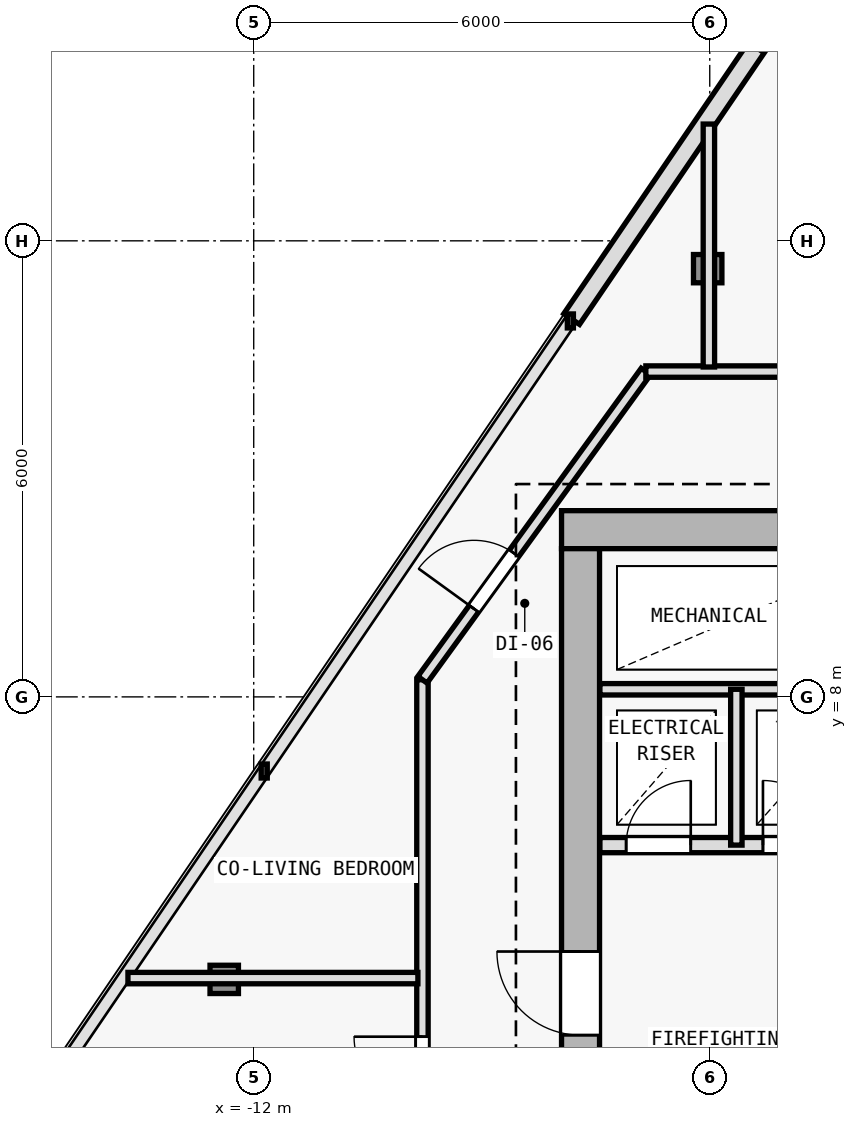
"""IFC4 building model, lengths in metres.
Left out: names, types, materials, properties, quantities, classifications, styles, units other than length and angle.
Written with IfcOpenShell. Run it as: python <this file> out.ifc"""

import sys

from ifc_helpers import new_model, si_unit, direction, frame, frame_2d, origin, origin_2d, place, context, subcontext, project, spatial, rectangle, i_section, extrude, element, fill, save


model = new_model("IFC4")
c1 = context("Model", 3, precision=1e-05, world=origin(), true_north=direction((0.0, 1.0)))
c2 = subcontext(c1, "Body", "Model", "MODEL_VIEW")
j1 = project(units=[si_unit("LENGTHUNIT", "METRE"), si_unit("PLANEANGLEUNIT", "RADIAN")], contexts=[c1])
p1 = place(None, origin())
s1 = spatial("IfcSite", under=j1, at=p1, CompositionType="ELEMENT")
p2 = place(p1, origin())
s2 = spatial("IfcBuilding", under=s1, at=p2, CompositionType="ELEMENT")
p3 = place(p2, frame((0.0, 0.0, 258.0)))
s3 = spatial("IfcBuildingStorey", under=s2, at=p3, CompositionType="ELEMENT", Elevation=258.0)
p4 = place(p3, frame((-7.7, 10.2, 0.0), z_axis=(0.0, 0.0, 1.0), x_axis=(1.0, 0.0, 0.0)))
e1 = element("IfcColumn", 1, at=p4, inside=s3, PredefinedType="COLUMN", context=c2, shape_type="SweptSolid", body=[
    extrude(i_section(OverallWidth=0.374, OverallDepth=0.372, WebThickness=0.012, FlangeThickness=0.02, FilletRadius=0.015, at=origin_2d()), origin(), (0.0, 0.0, 1.0), 3.6),
])
p5 = place(p3, frame((-6.027, 13.634, 0.006), z_axis=(0.00877514453, -0.002516901919, 0.999958330153), x_axis=(0.275705143097, 0.961242255662, 0.0)))
e2 = element("IfcColumn", 2, at=p5, inside=s3, PredefinedType="COLUMN", context=c2, shape_type="SweptSolid", body=[
    extrude(i_section(OverallWidth=0.374, OverallDepth=0.372, WebThickness=0.012, FlangeThickness=0.02, FilletRadius=0.015, at=origin_2d()), origin(), (0.0, 0.0, 1.0), 3.589),
])
p6 = place(p3, frame((-12.388, 4.283, 0.006), z_axis=(0.017003572908, 0.009522000828, 0.999810086971), x_axis=(-0.488603368932, 0.87250601595, 0.0)))
e3 = element("IfcColumn", 3, at=p6, inside=s3, PredefinedType="COLUMN", context=c2, shape_type="SweptSolid", body=[
    extrude(i_section(OverallWidth=0.374, OverallDepth=0.372, WebThickness=0.012, FlangeThickness=0.02, FilletRadius=0.015, at=origin_2d()), origin(), (0.0, 0.0, 1.0), 3.59),
])
p7 = place(p3, frame((-7.817, 12.971, 0.0), z_axis=(0.0, 0.0, 1.0), x_axis=(0.562474530687, 0.826814611826, 0.0)))
e4 = element("IfcWall", 4, at=p7, inside=s3, PredefinedType="SOLIDWALL", context=c2, shape_type="SweptSolid", body=[
    extrude(rectangle(XDim=10.107, YDim=0.25, at=frame_2d((5.053, 0.0))), origin(), (0.0, 0.0, 1.0), 3.35),
])
p8 = place(p7, frame((4.303, 0.0, 0.62)))
e5 = element("IfcOpeningElement", 5, at=p8, cuts=e4, PredefinedType="OPENING", context=c2, shape_type="SweptSolid", body=[
    extrude(rectangle(XDim=1.5, YDim=2.0, at=frame_2d((0.75, 1.0))), frame((0.0, 0.135, 0.0), z_axis=(0.0, -1.0, 0.0), x_axis=(1.0, 0.0, 0.0)), (0.0, 0.0, 1.0), 0.27),
])
p9 = place(p3, frame((7.95, 10.2, 0.0), z_axis=(0.0, 0.0, 1.0), x_axis=(-1.0, 0.0, 0.0)))
e6 = element("IfcWall", 6, at=p9, inside=s3, PredefinedType="SHEAR", context=c2, shape_type="SweptSolid", body=[
    extrude(rectangle(XDim=15.9, YDim=0.5, at=frame_2d((7.95, 0.0))), origin(), (0.0, 0.0, 1.0), 3.35),
])
p10 = place(p9, frame((4.4, 0.0, 0.0)))
e7 = element("IfcOpeningElement", 7, at=p10, cuts=e6, PredefinedType="OPENING", context=c2, shape_type="SweptSolid", body=[
    extrude(rectangle(XDim=1.1, YDim=2.15, at=frame_2d((0.55, 1.075))), frame((0.0, 0.26, 0.0), z_axis=(0.0, -1.0, 0.0), x_axis=(1.0, 0.0, 0.0)), (0.0, 0.0, 1.0), 0.52),
])
p11 = place(p3, frame((-7.7, -9.15, 0.0), z_axis=(0.0, 0.0, 1.0), x_axis=(0.0, 1.0, 0.0)))
e8 = element("IfcWall", 8, at=p11, inside=s3, PredefinedType="SHEAR", context=c2, shape_type="SweptSolid", body=[
    extrude(rectangle(XDim=19.1, YDim=0.5, at=frame_2d((9.55, 0.0))), origin(), (0.0, 0.0, 1.0), 3.35),
])
p12 = place(p11, frame((12.7, 0.0, 0.0)))
e9 = element("IfcOpeningElement", 9, at=p12, cuts=e8, PredefinedType="OPENING", context=c2, shape_type="SweptSolid", body=[
    extrude(rectangle(XDim=1.1, YDim=2.15, at=frame_2d((0.55, 1.075))), frame((0.0, 0.26, 0.0), z_axis=(0.0, -1.0, 0.0), x_axis=(1.0, 0.0, 0.0)), (0.0, 0.0, 1.0), 0.52),
])
p13 = place(p3, frame((-7.445, 6.05, 0.0), z_axis=(0.0, 0.0, 1.0), x_axis=(1.0, 0.0, 0.0)))
e10 = element("IfcWall", 10, at=p13, inside=s3, PredefinedType="SOLIDWALL", context=c2, shape_type="SweptSolid", body=[
    extrude(rectangle(XDim=3.595, YDim=0.2, at=frame_2d((1.797, 0.0))), origin(), (0.0, 0.0, 1.0), 3.35),
])
p14 = place(p13, frame((0.345, 0.0, 0.0)))
e11 = element("IfcOpeningElement", 11, at=p14, cuts=e10, PredefinedType="OPENING", context=c2, shape_type="SweptSolid", body=[
    extrude(rectangle(XDim=0.85, YDim=2.1, at=frame_2d((0.425, 1.05))), frame((0.0, 0.11, 0.0), z_axis=(0.0, -1.0, 0.0), x_axis=(1.0, 0.0, 0.0)), (0.0, 0.0, 1.0), 0.22),
])
p15 = place(p13, frame((2.145, 0.0, 0.0)))
e12 = element("IfcOpeningElement", 12, at=p15, cuts=e10, PredefinedType="OPENING", context=c2, shape_type="SweptSolid", body=[
    extrude(rectangle(XDim=0.85, YDim=2.1, at=frame_2d((0.425, 1.05))), frame((0.0, 0.11, 0.0), z_axis=(0.0, -1.0, 0.0), x_axis=(1.0, 0.0, 0.0)), (0.0, 0.0, 1.0), 0.22),
])
p16 = place(p3, frame((-7.445, 8.1, 0.0), z_axis=(0.0, 0.0, 1.0), x_axis=(1.0, 0.0, 0.0)))
e13 = element("IfcWall", 13, at=p16, inside=s3, PredefinedType="PARTITIONING", context=c2, shape_type="SweptSolid", body=[
    extrude(rectangle(XDim=3.595, YDim=0.15, at=frame_2d((1.797, 0.0))), origin(), (0.0, 0.0, 1.0), 3.35),
])
p17 = place(p3, frame((-5.65, 6.05, 0.0), z_axis=(0.0, 0.0, 1.0), x_axis=(0.0, 1.0, 0.0)))
e14 = element("IfcWall", 14, at=p17, inside=s3, PredefinedType="PARTITIONING", context=c2, shape_type="SweptSolid", body=[
    extrude(rectangle(XDim=2.05, YDim=0.15, at=frame_2d((1.025, 0.0))), origin(), (0.0, 0.0, 1.0), 3.35),
])
p18 = place(p3, frame((-9.78, -11.48, 0.0), z_axis=(0.0, 0.0, 1.0), x_axis=(0.0, 1.0, 0.0)))
e15 = element("IfcWall", 15, at=p18, inside=s3, PredefinedType="PARTITIONING", context=c2, shape_type="SweptSolid", body=[
    extrude(rectangle(XDim=19.706, YDim=0.15, at=frame_2d((9.853, 0.0))), origin(), (0.0, 0.0, 1.0), 2.875),
])
p19 = place(p18, frame((9.409, 0.0, 0.0)))
e16 = element("IfcOpeningElement", 16, at=p19, cuts=e15, PredefinedType="OPENING", context=c2, shape_type="SweptSolid", body=[
    extrude(rectangle(XDim=0.9, YDim=2.1, at=frame_2d((0.45, 1.05))), frame((0.0, 0.085, 0.0), z_axis=(0.0, -1.0, 0.0), x_axis=(1.0, 0.0, 0.0)), (0.0, 0.0, 1.0), 0.17),
])
p20 = place(p18, frame((7.113, 0.0, 0.0)))
e17 = element("IfcOpeningElement", 17, at=p20, cuts=e15, PredefinedType="OPENING", context=c2, shape_type="SweptSolid", body=[
    extrude(rectangle(XDim=0.9, YDim=2.1, at=frame_2d((0.45, 1.05))), frame((0.0, 0.085, 0.0), z_axis=(0.0, -1.0, 0.0), x_axis=(1.0, 0.0, 0.0)), (0.0, 0.0, 1.0), 0.17),
])
p21 = place(p18, frame((4.879, 0.0, 0.0)))
e18 = element("IfcOpeningElement", 18, at=p21, cuts=e15, PredefinedType="OPENING", context=c2, shape_type="SweptSolid", body=[
    extrude(rectangle(XDim=0.9, YDim=2.1, at=frame_2d((0.45, 1.05))), frame((0.0, 0.085, 0.0), z_axis=(0.0, -1.0, 0.0), x_axis=(1.0, 0.0, 0.0)), (0.0, 0.0, 1.0), 0.17),
])
p22 = place(p18, frame((3.148, 0.0, 0.0)))
e19 = element("IfcOpeningElement", 19, at=p22, cuts=e15, PredefinedType="OPENING", context=c2, shape_type="SweptSolid", body=[
    extrude(rectangle(XDim=0.85, YDim=2.1, at=frame_2d((0.425, 1.05))), frame((0.0, 0.085, 0.0), z_axis=(0.0, -1.0, 0.0), x_axis=(1.0, 0.0, 0.0)), (0.0, 0.0, 1.0), 0.17),
])
p23 = place(p18, frame((1.134, 0.0, 0.0)))
e20 = element("IfcOpeningElement", 20, at=p23, cuts=e15, PredefinedType="OPENING", context=c2, shape_type="SweptSolid", body=[
    extrude(rectangle(XDim=0.9, YDim=2.1, at=frame_2d((0.45, 1.05))), frame((0.0, 0.085, 0.0), z_axis=(0.0, -1.0, 0.0), x_axis=(1.0, 0.0, 0.0)), (0.0, 0.0, 1.0), 0.17),
])
p24 = place(p18, frame((14.11, 0.0, 0.0)))
e21 = element("IfcOpeningElement", 21, at=p24, cuts=e15, PredefinedType="OPENING", context=c2, shape_type="SweptSolid", body=[
    extrude(rectangle(XDim=0.9, YDim=2.1, at=frame_2d((0.45, 1.05))), frame((0.0, 0.085, 0.0), z_axis=(0.0, -1.0, 0.0), x_axis=(1.0, 0.0, 0.0)), (0.0, 0.0, 1.0), 0.17),
])
p25 = place(p18, frame((11.741, 0.0, 0.0)))
e22 = element("IfcOpeningElement", 22, at=p25, cuts=e15, PredefinedType="OPENING", context=c2, shape_type="SweptSolid", body=[
    extrude(rectangle(XDim=0.9, YDim=2.1, at=frame_2d((0.45, 1.05))), frame((0.0, 0.085, 0.0), z_axis=(0.0, -1.0, 0.0), x_axis=(1.0, 0.0, 0.0)), (0.0, 0.0, 1.0), 0.17),
])
p26 = place(p3, frame((-9.78, 8.226, 0.0), z_axis=(0.0, 0.0, 1.0), x_axis=(0.586956386413, 0.809618552436, 0.0)))
e23 = element("IfcWall", 23, at=p26, inside=s3, PredefinedType="PARTITIONING", context=c2, shape_type="SweptSolid", body=[
    extrude(rectangle(XDim=5.008, YDim=0.15, at=frame_2d((2.504, 0.0))), origin(), (0.0, 0.0, 1.0), 2.965),
])
p27 = place(p26, frame((1.154, 0.0, 0.0)))
e24 = element("IfcOpeningElement", 24, at=p27, cuts=e23, PredefinedType="OPENING", context=c2, shape_type="SweptSolid", body=[
    extrude(rectangle(XDim=0.9, YDim=2.1, at=frame_2d((0.45, 1.05))), frame((0.0, 0.085, 0.0), z_axis=(0.0, -1.0, 0.0), x_axis=(1.0, 0.0, 0.0)), (0.0, 0.0, 1.0), 0.17),
])
p28 = place(p3, frame((-6.841, 12.28, 0.0), z_axis=(0.0, 0.0, 1.0), x_axis=(1.0, 0.0, 0.0)))
e25 = element("IfcWall", 25, at=p28, inside=s3, PredefinedType="PARTITIONING", context=c2, shape_type="SweptSolid", body=[
    extrude(rectangle(XDim=13.682, YDim=0.15, at=frame_2d((6.841, 0.0))), origin(), (0.0, 0.0, 1.0), 3.015),
])
p29 = place(p28, frame((4.845, 0.0, 0.0)))
e26 = element("IfcOpeningElement", 26, at=p29, cuts=e25, PredefinedType="OPENING", context=c2, shape_type="SweptSolid", body=[
    extrude(rectangle(XDim=0.9, YDim=2.1, at=frame_2d((0.45, 1.05))), frame((0.0, 0.085, 0.0), z_axis=(0.0, -1.0, 0.0), x_axis=(1.0, 0.0, 0.0)), (0.0, 0.0, 1.0), 0.17),
])
p30 = place(p3, frame((-6.011, 12.34, 0.0), z_axis=(0.0, 0.0, 1.0), x_axis=(0.0, 1.0, 0.0)))
e27 = element("IfcWall", 27, at=p30, inside=s3, PredefinedType="PARTITIONING", context=c2, shape_type="SweptSolid", body=[
    extrude(rectangle(XDim=3.196, YDim=0.15, at=frame_2d((1.598, 0.0))), origin(), (0.0, 0.0, 1.0), 3.015),
])
p31 = place(p3, frame((-9.84, 4.301, 0.0), z_axis=(0.0, 0.0, 1.0), x_axis=(-1.0, 0.0, 0.0)))
e28 = element("IfcWall", 28, at=p31, inside=s3, PredefinedType="PARTITIONING", context=c2, shape_type="SweptSolid", body=[
    extrude(rectangle(XDim=3.815, YDim=0.15, at=frame_2d((1.907, 0.0))), origin(), (0.0, 0.0, 1.0), 3.015),
])
p32 = place(p12, origin())
e29 = element("IfcDoor", 29, at=p32, inside=s3, OperationType="SINGLE_SWING_RIGHT", PredefinedType="DOOR", context=c2, shape_type="SweptSolid", body=[
    extrude(rectangle(XDim=1.1, YDim=2.15, at=frame_2d((0.55, 1.075))), frame((0.0, 0.025, 0.0), z_axis=(0.0, -1.0, 0.0), x_axis=(1.0, 0.0, 0.0)), (0.0, 0.0, 1.0), 0.05),
])
fill(e9, e29)
p33 = place(p14, origin())
e30 = element("IfcDoor", 30, at=p33, inside=s3, OperationType="SINGLE_SWING_RIGHT", PredefinedType="DOOR", context=c2, shape_type="SweptSolid", body=[
    extrude(rectangle(XDim=0.85, YDim=2.1, at=frame_2d((0.425, 1.05))), frame((0.0, 0.025, 0.0), z_axis=(0.0, -1.0, 0.0), x_axis=(1.0, 0.0, 0.0)), (0.0, 0.0, 1.0), 0.05),
])
fill(e11, e30)
p34 = place(p15, origin())
e31 = element("IfcDoor", 31, at=p34, inside=s3, OperationType="SINGLE_SWING_LEFT", PredefinedType="DOOR", context=c2, shape_type="SweptSolid", body=[
    extrude(rectangle(XDim=0.85, YDim=2.1, at=frame_2d((0.425, 1.05))), frame((0.0, 0.025, 0.0), z_axis=(0.0, -1.0, 0.0), x_axis=(1.0, 0.0, 0.0)), (0.0, 0.0, 1.0), 0.05),
])
fill(e12, e31)
p35 = place(p27, origin())
e32 = element("IfcDoor", 32, at=p35, inside=s3, OperationType="SINGLE_SWING_LEFT", PredefinedType="DOOR", context=c2, shape_type="SweptSolid", body=[
    extrude(rectangle(XDim=0.9, YDim=2.1, at=frame_2d((0.45, 1.05))), frame((0.0, 0.025, 0.0), z_axis=(0.0, -1.0, 0.0), x_axis=(1.0, 0.0, 0.0)), (0.0, 0.0, 1.0), 0.05),
])
fill(e24, e32)
p36 = place(p24, origin())
e33 = element("IfcDoor", 33, at=p36, inside=s3, OperationType="SINGLE_SWING_RIGHT", PredefinedType="DOOR", context=c2, shape_type="SweptSolid", body=[
    extrude(rectangle(XDim=0.9, YDim=2.1, at=frame_2d((0.45, 1.05))), frame((0.0, 0.025, 0.0), z_axis=(0.0, -1.0, 0.0), x_axis=(1.0, 0.0, 0.0)), (0.0, 0.0, 1.0), 0.05),
])
fill(e21, e33)
save(model, sys.argv[1])
